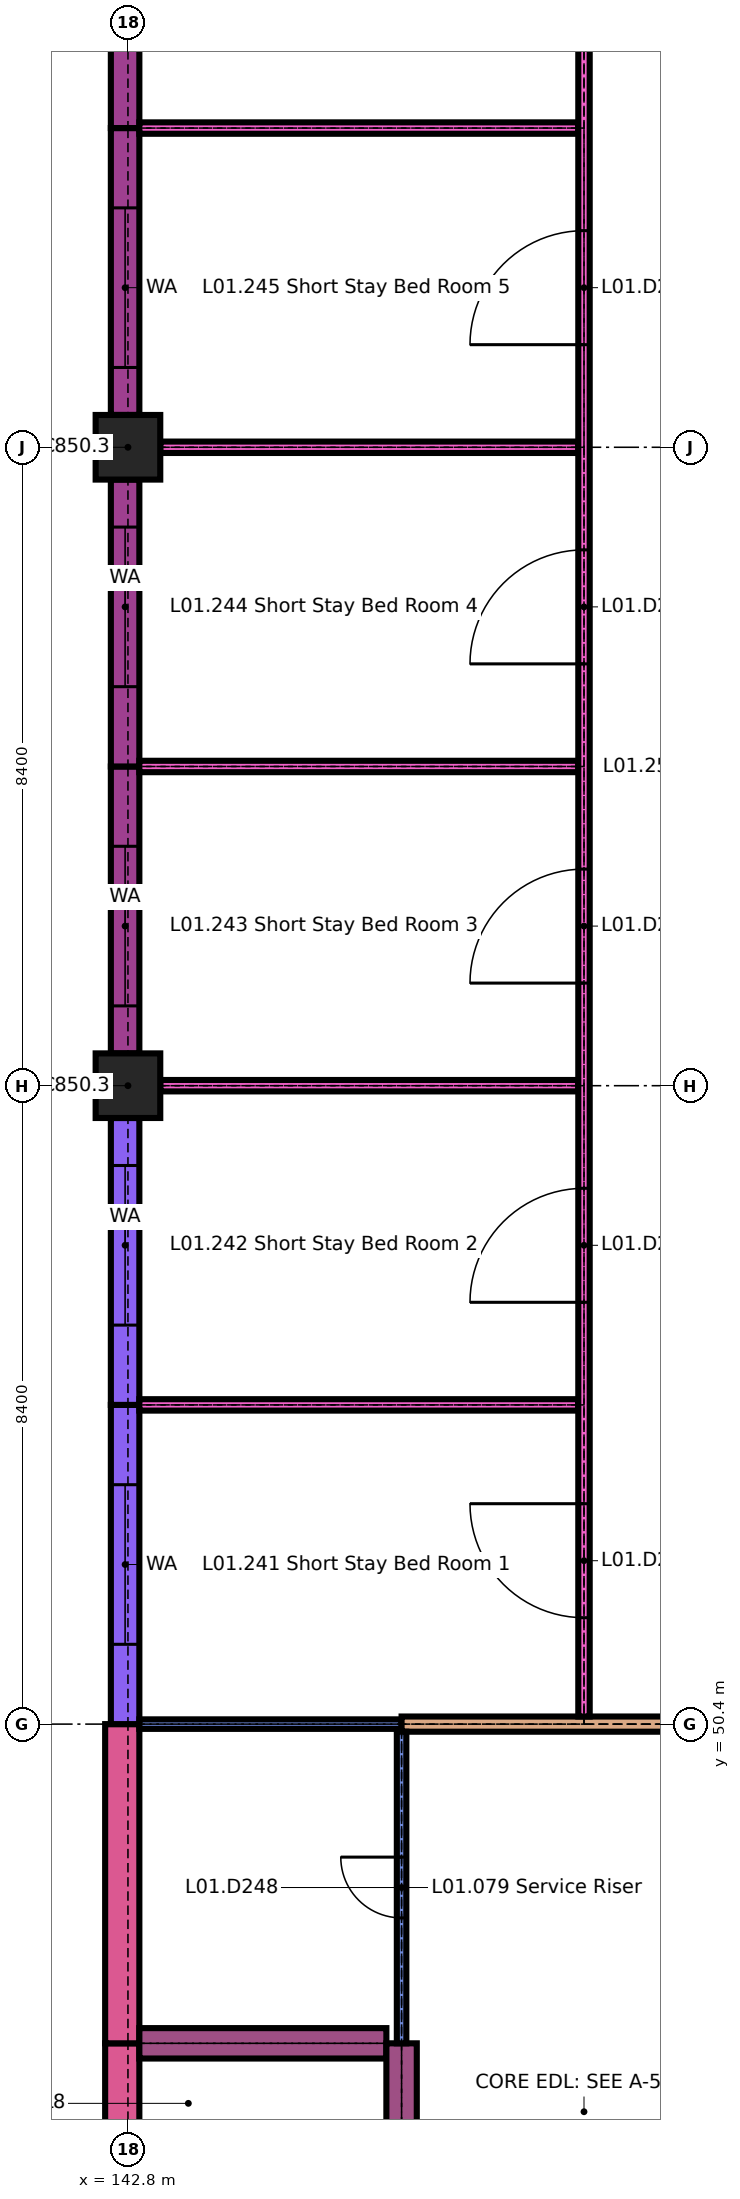
"""IFC4 building model, lengths in metres.
Left out: names, types, materials, properties, quantities, classifications, styles, units other than length and angle.
Written with IfcOpenShell. Run it as: python <this file> out.ifc"""

import sys

from ifc_helpers import new_model, si_unit, direction, frame, frame_2d, origin, origin_2d, place, context, subcontext, project, spatial, rectangle, extrude, element, fill, save


model = new_model("IFC4")
c1 = context("Model", 3, precision=1e-05, world=origin(), true_north=direction((0.0, 1.0)))
c2 = subcontext(c1, "Body", "Model", "MODEL_VIEW")
j1 = project(units=[si_unit("LENGTHUNIT", "METRE"), si_unit("PLANEANGLEUNIT", "RADIAN")], contexts=[c1])
p1 = place(None, origin())
s1 = spatial("IfcSite", under=j1, at=p1, CompositionType="ELEMENT")
p2 = place(p1, origin())
s2 = spatial("IfcBuilding", under=s1, at=p2, CompositionType="ELEMENT")
p3 = place(p2, frame((0.0, 0.0, 4.5)))
s3 = spatial("IfcBuildingStorey", under=s2, at=p3, CompositionType="ELEMENT", Elevation=4.5)
for number, where, z_axis, x_axis in (
    (1, (142.8, 58.8, 0.0), (0.0, 0.0, 1.0), (1.0, 0.0, 0.0)),
    (2, (142.8, 67.2, 0.0), (0.0, 0.0, 1.0), (1.0, 0.0, 0.0)),
):
    element("IfcColumn", number, at=place(p3, frame(where, z_axis=z_axis, x_axis=x_axis)), inside=s3, PredefinedType="COLUMN", context=c2, shape_type="SweptSolid", body=[
        extrude(rectangle(XDim=0.85, YDim=0.85, at=origin_2d()), origin(), (0.0, 0.0, 1.0), 3.45),
    ])
for number, where, z_axis, x_axis in (
    (3, (142.725, 42.0, 0.0), (0.0, 0.0, 1.0), (0.0, 1.0, 0.0)),
    (4, (142.725, 46.2, 0.0), (0.0, 0.0, 1.0), (0.0, 1.0, 0.0)),
):
    element("IfcWall", number, at=place(p3, frame(where, z_axis=z_axis, x_axis=x_axis)), inside=s3, PredefinedType="SOLIDWALL", context=c2, shape_type="SweptSolid", body=[
        extrude(rectangle(XDim=4.2, YDim=0.45, at=frame_2d((2.1, 0.0))), origin(), (0.0, 0.0, 1.0), 3.6),
    ])
p4 = place(p3, frame((142.762, 50.4, 0.0), z_axis=(0.0, 0.0, 1.0), x_axis=(0.0, 1.0, 0.0)))
e5 = element("IfcWall", 5, at=p4, inside=s3, PredefinedType="SOLIDWALL", context=c2, shape_type="SweptSolid", body=[
    extrude(rectangle(XDim=4.2, YDim=0.375, at=frame_2d((2.1, 0.0))), origin(), (0.0, 0.0, 1.0), 3.6),
])
p5 = place(p4, frame((1.05, 0.0, 0.9)))
e6 = element("IfcOpeningElement", 6, at=p5, cuts=e5, PredefinedType="OPENING", context=c2, shape_type="SweptSolid", body=[
    extrude(rectangle(XDim=2.1, YDim=1.5, at=frame_2d((1.05, 0.75))), frame((0.0, 0.198, 0.0), z_axis=(0.0, -1.0, 0.0), x_axis=(1.0, 0.0, 0.0)), (0.0, 0.0, 1.0), 0.395),
])
p6 = place(p3, frame((142.762, 54.6, 0.0), z_axis=(0.0, 0.0, 1.0), x_axis=(0.0, 1.0, 0.0)))
e7 = element("IfcWall", 7, at=p6, inside=s3, PredefinedType="SOLIDWALL", context=c2, shape_type="SweptSolid", body=[
    extrude(rectangle(XDim=3.775, YDim=0.375, at=frame_2d((1.887, 0.0))), origin(), (0.0, 0.0, 1.0), 3.6),
])
p7 = place(p6, frame((1.05, 0.0, 0.9)))
e8 = element("IfcOpeningElement", 8, at=p7, cuts=e7, PredefinedType="OPENING", context=c2, shape_type="SweptSolid", body=[
    extrude(rectangle(XDim=2.1, YDim=1.5, at=frame_2d((1.05, 0.75))), frame((0.0, 0.198, 0.0), z_axis=(0.0, -1.0, 0.0), x_axis=(1.0, 0.0, 0.0)), (0.0, 0.0, 1.0), 0.395),
])
p8 = place(p3, frame((142.762, 59.225, 0.0), z_axis=(0.0, 0.0, 1.0), x_axis=(0.0, 1.0, 0.0)))
e9 = element("IfcWall", 9, at=p8, inside=s3, PredefinedType="SOLIDWALL", context=c2, shape_type="SweptSolid", body=[
    extrude(rectangle(XDim=3.775, YDim=0.375, at=frame_2d((1.887, 0.0))), origin(), (0.0, 0.0, 1.0), 3.15),
])
p9 = place(p8, frame((0.625, 0.0, 0.9)))
e10 = element("IfcOpeningElement", 10, at=p9, cuts=e9, PredefinedType="OPENING", context=c2, shape_type="SweptSolid", body=[
    extrude(rectangle(XDim=2.1, YDim=1.5, at=frame_2d((1.05, 0.75))), frame((0.0, 0.198, 0.0), z_axis=(0.0, -1.0, 0.0), x_axis=(1.0, 0.0, 0.0)), (0.0, 0.0, 1.0), 0.395),
])
p10 = place(p3, frame((142.762, 63.0, 0.0), z_axis=(0.0, 0.0, 1.0), x_axis=(0.0, 1.0, 0.0)))
e11 = element("IfcWall", 11, at=p10, inside=s3, PredefinedType="SOLIDWALL", context=c2, shape_type="SweptSolid", body=[
    extrude(rectangle(XDim=3.775, YDim=0.375, at=frame_2d((1.887, 0.0))), origin(), (0.0, 0.0, 1.0), 3.15),
])
p11 = place(p10, frame((1.05, 0.0, 0.9)))
e12 = element("IfcOpeningElement", 12, at=p11, cuts=e11, PredefinedType="OPENING", context=c2, shape_type="SweptSolid", body=[
    extrude(rectangle(XDim=2.1, YDim=1.5, at=frame_2d((1.05, 0.75))), frame((0.0, 0.198, 0.0), z_axis=(0.0, -1.0, 0.0), x_axis=(1.0, 0.0, 0.0)), (0.0, 0.0, 1.0), 0.395),
])
p12 = place(p3, frame((142.762, 67.625, 0.0), z_axis=(0.0, 0.0, 1.0), x_axis=(0.0, 1.0, 0.0)))
e13 = element("IfcWall", 13, at=p12, inside=s3, PredefinedType="SOLIDWALL", context=c2, shape_type="SweptSolid", body=[
    extrude(rectangle(XDim=3.775, YDim=0.375, at=frame_2d((1.887, 0.0))), origin(), (0.0, 0.0, 1.0), 3.15),
])
p13 = place(p12, frame((0.625, 0.0, 0.9)))
e14 = element("IfcOpeningElement", 14, at=p13, cuts=e13, PredefinedType="OPENING", context=c2, shape_type="SweptSolid", body=[
    extrude(rectangle(XDim=2.1, YDim=1.5, at=frame_2d((1.05, 0.75))), frame((0.0, 0.198, 0.0), z_axis=(0.0, -1.0, 0.0), x_axis=(1.0, 0.0, 0.0)), (0.0, 0.0, 1.0), 0.395),
])
p14 = place(p3, frame((142.762, 71.4, 0.0), z_axis=(0.0, 0.0, 1.0), x_axis=(0.0, 1.0, 0.0)))
e15 = element("IfcWall", 15, at=p14, inside=s3, PredefinedType="SOLIDWALL", context=c2, shape_type="SweptSolid", body=[
    extrude(rectangle(XDim=4.2, YDim=0.375, at=frame_2d((2.1, 0.0))), origin(), (0.0, 0.0, 1.0), 3.15),
])
p15 = place(p14, frame((1.05, 0.0, 0.9)))
e16 = element("IfcOpeningElement", 16, at=p15, cuts=e15, PredefinedType="OPENING", context=c2, shape_type="SweptSolid", body=[
    extrude(rectangle(XDim=2.1, YDim=1.5, at=frame_2d((1.05, 0.75))), frame((0.0, 0.198, 0.0), z_axis=(0.0, -1.0, 0.0), x_axis=(1.0, 0.0, 0.0)), (0.0, 0.0, 1.0), 0.395),
])
p16 = place(p3, frame((142.95, 46.2, 0.0), z_axis=(0.0, 0.0, 1.0), x_axis=(1.0, 0.0, 0.0)))
e17 = element("IfcWall", 17, at=p16, inside=s3, PredefinedType="SHEAR", context=c2, shape_type="SweptSolid", body=[
    extrude(rectangle(XDim=3.25, YDim=0.4, at=frame_2d((1.625, 0.0))), origin(), (0.0, 0.0, 1.0), 3.6),
])
p17 = place(p3, frame((142.95, 50.4, 0.0), z_axis=(0.0, 0.0, 1.0), x_axis=(1.0, 0.0, 0.0)))
e18 = element("IfcWall", 18, at=p17, inside=s3, PredefinedType="SOLIDWALL", context=c2, shape_type="SweptSolid", body=[
    extrude(rectangle(XDim=3.45, YDim=0.125, at=frame_2d((1.725, 0.0))), origin(), (0.0, 0.0, 1.0), 3.6),
])
p18 = place(p3, frame((146.4, 50.4, 0.0), z_axis=(0.0, 0.0, 1.0), x_axis=(1.0, 0.0, 0.0)))
e19 = element("IfcWall", 19, at=p18, inside=s3, PredefinedType="PARTITIONING", context=c2, shape_type="SweptSolid", body=[
    extrude(rectangle(XDim=4.9, YDim=0.2, at=frame_2d((2.45, 0.0))), origin(), (0.0, 0.0, 1.0), 3.6),
])
p19 = place(p3, frame((142.95, 54.6, 0.0), z_axis=(0.0, 0.0, 1.0), x_axis=(1.0, 0.0, 0.0)))
e20 = element("IfcWall", 20, at=p19, inside=s3, PredefinedType="PARTITIONING", context=c2, shape_type="SweptSolid", body=[
    extrude(rectangle(XDim=5.775, YDim=0.15, at=frame_2d((2.888, 0.0))), origin(), (0.0, 0.0, 1.0), 3.6),
])
p20 = place(p3, frame((143.225, 58.8, 0.0), z_axis=(0.0, 0.0, 1.0), x_axis=(1.0, 0.0, 0.0)))
e21 = element("IfcWall", 21, at=p20, inside=s3, PredefinedType="PARTITIONING", context=c2, shape_type="SweptSolid", body=[
    extrude(rectangle(XDim=5.5, YDim=0.15, at=frame_2d((2.75, 0.0))), origin(), (0.0, 0.0, 1.0), 3.6),
])
p21 = place(p3, frame((142.95, 63.0, 0.0), z_axis=(0.0, 0.0, 1.0), x_axis=(1.0, 0.0, 0.0)))
e22 = element("IfcWall", 22, at=p21, inside=s3, PredefinedType="PARTITIONING", context=c2, shape_type="SweptSolid", body=[
    extrude(rectangle(XDim=5.775, YDim=0.15, at=frame_2d((2.888, 0.0))), origin(), (0.0, 0.0, 1.0), 3.6),
])
p22 = place(p3, frame((143.225, 67.2, 0.0), z_axis=(0.0, 0.0, 1.0), x_axis=(1.0, 0.0, 0.0)))
e23 = element("IfcWall", 23, at=p22, inside=s3, PredefinedType="PARTITIONING", context=c2, shape_type="SweptSolid", body=[
    extrude(rectangle(XDim=5.5, YDim=0.15, at=frame_2d((2.75, 0.0))), origin(), (0.0, 0.0, 1.0), 3.6),
])
p23 = place(p3, frame((142.95, 71.4, 0.0), z_axis=(0.0, 0.0, 1.0), x_axis=(1.0, 0.0, 0.0)))
e24 = element("IfcWall", 24, at=p23, inside=s3, PredefinedType="PARTITIONING", context=c2, shape_type="SweptSolid", body=[
    extrude(rectangle(XDim=5.775, YDim=0.15, at=frame_2d((2.888, 0.0))), origin(), (0.0, 0.0, 1.0), 3.6),
])
p24 = place(p3, frame((146.4, 42.2, 0.0), z_axis=(0.0, 0.0, 1.0), x_axis=(0.0, 1.0, 0.0)))
e25 = element("IfcWall", 25, at=p24, inside=s3, PredefinedType="SHEAR", context=c2, shape_type="SweptSolid", body=[
    extrude(rectangle(XDim=4.0, YDim=0.4, at=frame_2d((2.0, 0.0))), origin(), (0.0, 0.0, 1.0), 3.6),
])
p25 = place(p24, frame((1.3, 0.0, 0.0)))
e26 = element("IfcOpeningElement", 26, at=p25, cuts=e25, PredefinedType="OPENING", context=c2, shape_type="SweptSolid", body=[
    extrude(rectangle(XDim=1.4, YDim=2.1, at=frame_2d((0.7, 1.05))), frame((0.0, 0.21, 0.0), z_axis=(0.0, -1.0, 0.0), x_axis=(1.0, 0.0, 0.0)), (0.0, 0.0, 1.0), 0.42),
])
p26 = place(p3, frame((146.4, 46.2, 0.0), z_axis=(0.0, 0.0, 1.0), x_axis=(0.0, 1.0, 0.0)))
e27 = element("IfcWall", 27, at=p26, inside=s3, PredefinedType="SOLIDWALL", context=c2, shape_type="SweptSolid", body=[
    extrude(rectangle(XDim=4.1, YDim=0.125, at=frame_2d((2.05, 0.0))), origin(), (0.0, 0.0, 1.0), 3.6),
])
p27 = place(p26, frame((1.65, 0.0, 0.0)))
e28 = element("IfcOpeningElement", 28, at=p27, cuts=e27, PredefinedType="OPENING", context=c2, shape_type="SweptSolid", body=[
    extrude(rectangle(XDim=0.8, YDim=2.1, at=frame_2d((0.4, 1.05))), frame((0.0, 0.073, 0.0), z_axis=(0.0, -1.0, 0.0), x_axis=(1.0, 0.0, 0.0)), (0.0, 0.0, 1.0), 0.145),
])
p28 = place(p3, frame((148.8, 50.5, 0.0), z_axis=(0.0, 0.0, 1.0), x_axis=(0.0, 1.0, 0.0)))
e29 = element("IfcWall", 29, at=p28, inside=s3, PredefinedType="PARTITIONING", context=c2, shape_type="SweptSolid", body=[
    extrude(rectangle(XDim=25.0, YDim=0.15, at=frame_2d((12.5, 0.0))), origin(), (0.0, 0.0, 1.0), 3.6),
])
p29 = place(p28, frame((1.3, 0.0, 0.0)))
e30 = element("IfcOpeningElement", 30, at=p29, cuts=e29, PredefinedType="OPENING", context=c2, shape_type="SweptSolid", body=[
    extrude(rectangle(XDim=1.5, YDim=2.4, at=frame_2d((0.75, 1.2))), frame((0.0, 0.085, 0.0), z_axis=(0.0, -1.0, 0.0), x_axis=(1.0, 0.0, 0.0)), (0.0, 0.0, 1.0), 0.17),
])
p30 = place(p28, frame((5.45, 0.0, 0.0)))
e31 = element("IfcOpeningElement", 31, at=p30, cuts=e29, PredefinedType="OPENING", context=c2, shape_type="SweptSolid", body=[
    extrude(rectangle(XDim=1.5, YDim=2.4, at=frame_2d((0.75, 1.2))), frame((0.0, 0.085, 0.0), z_axis=(0.0, -1.0, 0.0), x_axis=(1.0, 0.0, 0.0)), (0.0, 0.0, 1.0), 0.17),
])
p31 = place(p28, frame((9.65, 0.0, 0.0)))
e32 = element("IfcOpeningElement", 32, at=p31, cuts=e29, PredefinedType="OPENING", context=c2, shape_type="SweptSolid", body=[
    extrude(rectangle(XDim=1.5, YDim=2.4, at=frame_2d((0.75, 1.2))), frame((0.0, 0.085, 0.0), z_axis=(0.0, -1.0, 0.0), x_axis=(1.0, 0.0, 0.0)), (0.0, 0.0, 1.0), 0.17),
])
p32 = place(p28, frame((13.85, 0.0, 0.0)))
e33 = element("IfcOpeningElement", 33, at=p32, cuts=e29, PredefinedType="OPENING", context=c2, shape_type="SweptSolid", body=[
    extrude(rectangle(XDim=1.5, YDim=2.4, at=frame_2d((0.75, 1.2))), frame((0.0, 0.085, 0.0), z_axis=(0.0, -1.0, 0.0), x_axis=(1.0, 0.0, 0.0)), (0.0, 0.0, 1.0), 0.17),
])
p33 = place(p28, frame((18.05, 0.0, 0.0)))
e34 = element("IfcOpeningElement", 34, at=p33, cuts=e29, PredefinedType="OPENING", context=c2, shape_type="SweptSolid", body=[
    extrude(rectangle(XDim=1.5, YDim=2.4, at=frame_2d((0.75, 1.2))), frame((0.0, 0.085, 0.0), z_axis=(0.0, -1.0, 0.0), x_axis=(1.0, 0.0, 0.0)), (0.0, 0.0, 1.0), 0.17),
])
p34 = place(p28, frame((22.2, 0.0, 0.0)))
e35 = element("IfcOpeningElement", 35, at=p34, cuts=e29, PredefinedType="OPENING", context=c2, shape_type="SweptSolid", body=[
    extrude(rectangle(XDim=1.5, YDim=2.4, at=frame_2d((0.75, 1.2))), frame((0.0, 0.085, 0.0), z_axis=(0.0, -1.0, 0.0), x_axis=(1.0, 0.0, 0.0)), (0.0, 0.0, 1.0), 0.17),
])
p35 = place(p5, origin())
e36 = element("IfcWindow", 36, at=p35, inside=s3, PartitioningType="DOUBLE_PANEL_VERTICAL", PredefinedType="WINDOW", context=c2, shape_type="SweptSolid", body=[
    extrude(rectangle(XDim=2.1, YDim=1.5, at=frame_2d((1.05, 0.75))), frame((0.0, 0.03, 0.0), z_axis=(0.0, -1.0, 0.0), x_axis=(1.0, 0.0, 0.0)), (0.0, 0.0, 1.0), 0.06),
])
fill(e6, e36)
p36 = place(p7, origin())
e37 = element("IfcWindow", 37, at=p36, inside=s3, PartitioningType="DOUBLE_PANEL_VERTICAL", PredefinedType="WINDOW", context=c2, shape_type="SweptSolid", body=[
    extrude(rectangle(XDim=2.1, YDim=1.5, at=frame_2d((1.05, 0.75))), frame((0.0, 0.03, 0.0), z_axis=(0.0, -1.0, 0.0), x_axis=(1.0, 0.0, 0.0)), (0.0, 0.0, 1.0), 0.06),
])
fill(e8, e37)
p37 = place(p9, origin())
e38 = element("IfcWindow", 38, at=p37, inside=s3, PartitioningType="DOUBLE_PANEL_VERTICAL", PredefinedType="WINDOW", context=c2, shape_type="SweptSolid", body=[
    extrude(rectangle(XDim=2.1, YDim=1.5, at=frame_2d((1.05, 0.75))), frame((0.0, 0.03, 0.0), z_axis=(0.0, -1.0, 0.0), x_axis=(1.0, 0.0, 0.0)), (0.0, 0.0, 1.0), 0.06),
])
fill(e10, e38)
p38 = place(p11, origin())
e39 = element("IfcWindow", 39, at=p38, inside=s3, PartitioningType="DOUBLE_PANEL_VERTICAL", PredefinedType="WINDOW", context=c2, shape_type="SweptSolid", body=[
    extrude(rectangle(XDim=2.1, YDim=1.5, at=frame_2d((1.05, 0.75))), frame((0.0, 0.03, 0.0), z_axis=(0.0, -1.0, 0.0), x_axis=(1.0, 0.0, 0.0)), (0.0, 0.0, 1.0), 0.06),
])
fill(e12, e39)
p39 = place(p13, origin())
e40 = element("IfcWindow", 40, at=p39, inside=s3, PartitioningType="DOUBLE_PANEL_VERTICAL", PredefinedType="WINDOW", context=c2, shape_type="SweptSolid", body=[
    extrude(rectangle(XDim=2.1, YDim=1.5, at=frame_2d((1.05, 0.75))), frame((0.0, 0.03, 0.0), z_axis=(0.0, -1.0, 0.0), x_axis=(1.0, 0.0, 0.0)), (0.0, 0.0, 1.0), 0.06),
])
fill(e14, e40)
p40 = place(p27, origin())
e41 = element("IfcDoor", 41, at=p40, inside=s3, OperationType="SINGLE_SWING_LEFT", PredefinedType="DOOR", context=c2, shape_type="SweptSolid", body=[
    extrude(rectangle(XDim=0.8, YDim=2.1, at=frame_2d((0.4, 1.05))), frame((0.0, 0.03, 0.0), z_axis=(0.0, -1.0, 0.0), x_axis=(1.0, 0.0, 0.0)), (0.0, 0.0, 1.0), 0.06),
])
fill(e28, e41)
p41 = place(p29, origin())
e42 = element("IfcDoor", 42, at=p41, inside=s3, OperationType="SINGLE_SWING_LEFT", PredefinedType="DOOR", context=c2, shape_type="SweptSolid", body=[
    extrude(rectangle(XDim=1.5, YDim=2.4, at=frame_2d((0.75, 1.2))), frame((0.0, 0.03, 0.0), z_axis=(0.0, -1.0, 0.0), x_axis=(1.0, 0.0, 0.0)), (0.0, 0.0, 1.0), 0.06),
])
fill(e30, e42)
p42 = place(p30, origin())
e43 = element("IfcDoor", 43, at=p42, inside=s3, OperationType="SINGLE_SWING_RIGHT", PredefinedType="DOOR", context=c2, shape_type="SweptSolid", body=[
    extrude(rectangle(XDim=1.5, YDim=2.4, at=frame_2d((0.75, 1.2))), frame((0.0, 0.03, 0.0), z_axis=(0.0, -1.0, 0.0), x_axis=(1.0, 0.0, 0.0)), (0.0, 0.0, 1.0), 0.06),
])
fill(e31, e43)
p43 = place(p31, origin())
e44 = element("IfcDoor", 44, at=p43, inside=s3, OperationType="SINGLE_SWING_RIGHT", PredefinedType="DOOR", context=c2, shape_type="SweptSolid", body=[
    extrude(rectangle(XDim=1.5, YDim=2.4, at=frame_2d((0.75, 1.2))), frame((0.0, 0.03, 0.0), z_axis=(0.0, -1.0, 0.0), x_axis=(1.0, 0.0, 0.0)), (0.0, 0.0, 1.0), 0.06),
])
fill(e32, e44)
p44 = place(p32, origin())
e45 = element("IfcDoor", 45, at=p44, inside=s3, OperationType="SINGLE_SWING_RIGHT", PredefinedType="DOOR", context=c2, shape_type="SweptSolid", body=[
    extrude(rectangle(XDim=1.5, YDim=2.4, at=frame_2d((0.75, 1.2))), frame((0.0, 0.03, 0.0), z_axis=(0.0, -1.0, 0.0), x_axis=(1.0, 0.0, 0.0)), (0.0, 0.0, 1.0), 0.06),
])
fill(e33, e45)
p45 = place(p33, origin())
e46 = element("IfcDoor", 46, at=p45, inside=s3, OperationType="SINGLE_SWING_RIGHT", PredefinedType="DOOR", context=c2, shape_type="SweptSolid", body=[
    extrude(rectangle(XDim=1.5, YDim=2.4, at=frame_2d((0.75, 1.2))), frame((0.0, 0.03, 0.0), z_axis=(0.0, -1.0, 0.0), x_axis=(1.0, 0.0, 0.0)), (0.0, 0.0, 1.0), 0.06),
])
fill(e34, e46)
save(model, sys.argv[1])
